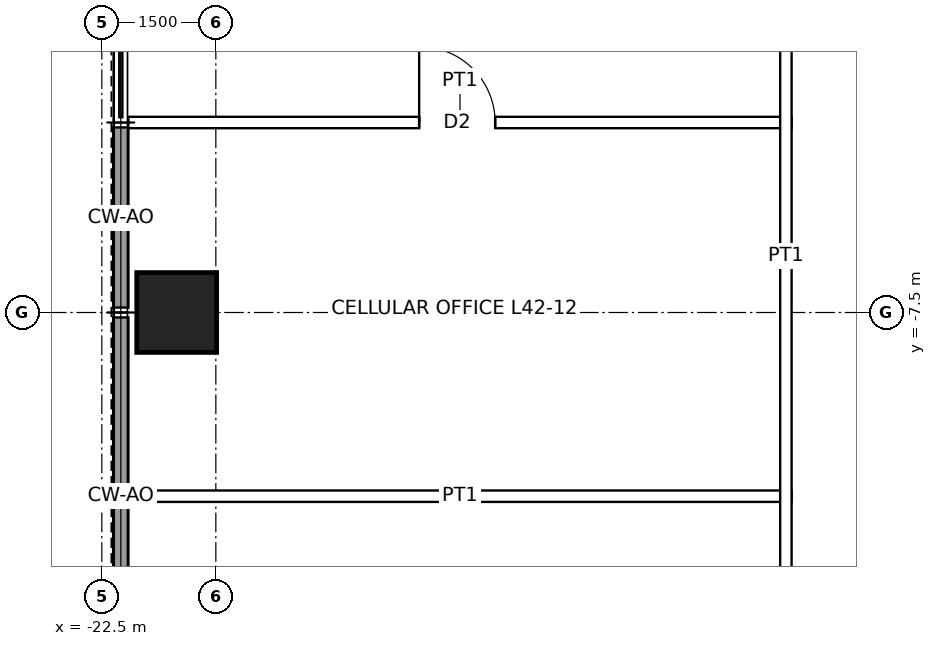
"""IFC4 building model, lengths in metres.
Left out: names, types, materials, properties, quantities, classifications, styles, units other than length and angle.
Written with IfcOpenShell. Run it as: python <this file> out.ifc"""

import sys

from ifc_helpers import new_model, si_unit, direction, frame, frame_2d, origin, origin_2d, place, context, subcontext, project, spatial, rectangle, hollow_rectangle, extrude, element, fill, save


model = new_model("IFC4")
c1 = context("Model", 3, precision=1e-05, world=origin(), true_north=direction((0.0, 1.0)))
c2 = subcontext(c1, "Body", "Model", "MODEL_VIEW")
j1 = project(units=[si_unit("LENGTHUNIT", "METRE"), si_unit("PLANEANGLEUNIT", "RADIAN")], contexts=[c1])
p1 = place(None, origin())
s1 = spatial("IfcSite", under=j1, at=p1, CompositionType="ELEMENT")
p2 = place(p1, origin())
s2 = spatial("IfcBuilding", under=s1, at=p2, CompositionType="ELEMENT")
p3 = place(p2, frame((0.0, 0.0, 201.9)))
s3 = spatial("IfcBuildingStorey", under=s2, at=p3, CompositionType="ELEMENT", Elevation=201.9)
p4 = place(p3, frame((-21.515, -7.5, 0.0), z_axis=(0.0, 0.0, 1.0), x_axis=(1.0, 0.0, 0.0)))
e1 = element("IfcColumn", 1, at=p4, inside=s3, PredefinedType="COLUMN", context=c2, shape_type="SweptSolid", body=[
    extrude(hollow_rectangle(XDim=1.05, YDim=1.05, WallThickness=0.07, at=origin_2d()), origin(), (0.0, 0.0, 1.0), 4.0),
])
for number, where, z_axis, x_axis in (
    (2, (-22.25, -12.268, 0.0), (0.0, 0.0, 1.0), (0.0, 1.0, 0.0)),
    (3, (-22.25, -9.884, 0.0), (0.0, 0.0, 1.0), (0.0, 1.0, 0.0)),
):
    element("IfcWall", number, at=place(p3, frame(where, z_axis=z_axis, x_axis=x_axis)), inside=s3, PredefinedType="SOLIDWALL", context=c2, shape_type="SweptSolid", body=[
        extrude(rectangle(XDim=2.319, YDim=0.2, at=frame_2d((1.16, 0.0))), origin(), (0.0, 0.0, 1.0), 3.85),
    ])
p5 = place(p3, frame((-22.25, -7.435, 0.0), z_axis=(0.0, 0.0, 1.0), x_axis=(0.0, 1.0, 0.0)))
e4 = element("IfcWall", 4, at=p5, inside=s3, PredefinedType="SOLIDWALL", context=c2, shape_type="SweptSolid", body=[
    extrude(rectangle(XDim=2.37, YDim=0.2, at=frame_2d((1.185, 0.0))), origin(), (0.0, 0.0, 1.0), 3.85),
])
p6 = place(p3, frame((-22.15, -9.917, 0.0), z_axis=(0.0, 0.0, 1.0), x_axis=(1.0, 0.0, 0.0)))
e5 = element("IfcWall", 5, at=p6, inside=s3, PredefinedType="PARTITIONING", context=c2, shape_type="SweptSolid", body=[
    extrude(rectangle(XDim=8.725, YDim=0.15, at=frame_2d((4.362, 0.0))), origin(), (0.0, 0.0, 1.0), 3.85),
])
p7 = place(p3, frame((-22.15, -5.0, 0.0), z_axis=(0.0, 0.0, 1.0), x_axis=(1.0, 0.0, 0.0)))
e6 = element("IfcWall", 6, at=p7, inside=s3, PredefinedType="PARTITIONING", context=c2, shape_type="SweptSolid", body=[
    extrude(rectangle(XDim=8.725, YDim=0.15, at=frame_2d((4.362, 0.0))), origin(), (0.0, 0.0, 1.0), 3.85),
])
p8 = place(p7, frame((3.825, 0.0, 0.0)))
e7 = element("IfcOpeningElement", 7, at=p8, cuts=e6, PredefinedType="OPENING", context=c2, shape_type="SweptSolid", body=[
    extrude(rectangle(XDim=1.0, YDim=2.1, at=frame_2d((0.5, 1.05))), frame((0.0, 0.085, 0.0), z_axis=(0.0, -1.0, 0.0), x_axis=(1.0, 0.0, 0.0)), (0.0, 0.0, 1.0), 0.17),
])
p9 = place(p3, frame((-13.5, -13.575, 0.0), z_axis=(0.0, 0.0, 1.0), x_axis=(0.0, 1.0, 0.0)))
e8 = element("IfcWall", 8, at=p9, inside=s3, PredefinedType="PARTITIONING", context=c2, shape_type="SweptSolid", body=[
    extrude(rectangle(XDim=13.65, YDim=0.15, at=frame_2d((6.825, 0.0))), origin(), (0.0, 0.0, 1.0), 3.85),
])
p10 = place(p8, origin())
e9 = element("IfcDoor", 9, at=p10, inside=s3, OperationType="SINGLE_SWING_LEFT", PredefinedType="DOOR", context=c2, shape_type="SweptSolid", body=[
    extrude(rectangle(XDim=1.0, YDim=2.1, at=frame_2d((0.5, 1.05))), frame((0.0, 0.025, 0.0), z_axis=(0.0, -1.0, 0.0), x_axis=(1.0, 0.0, 0.0)), (0.0, 0.0, 1.0), 0.05),
])
fill(e7, e9)
save(model, sys.argv[1])
